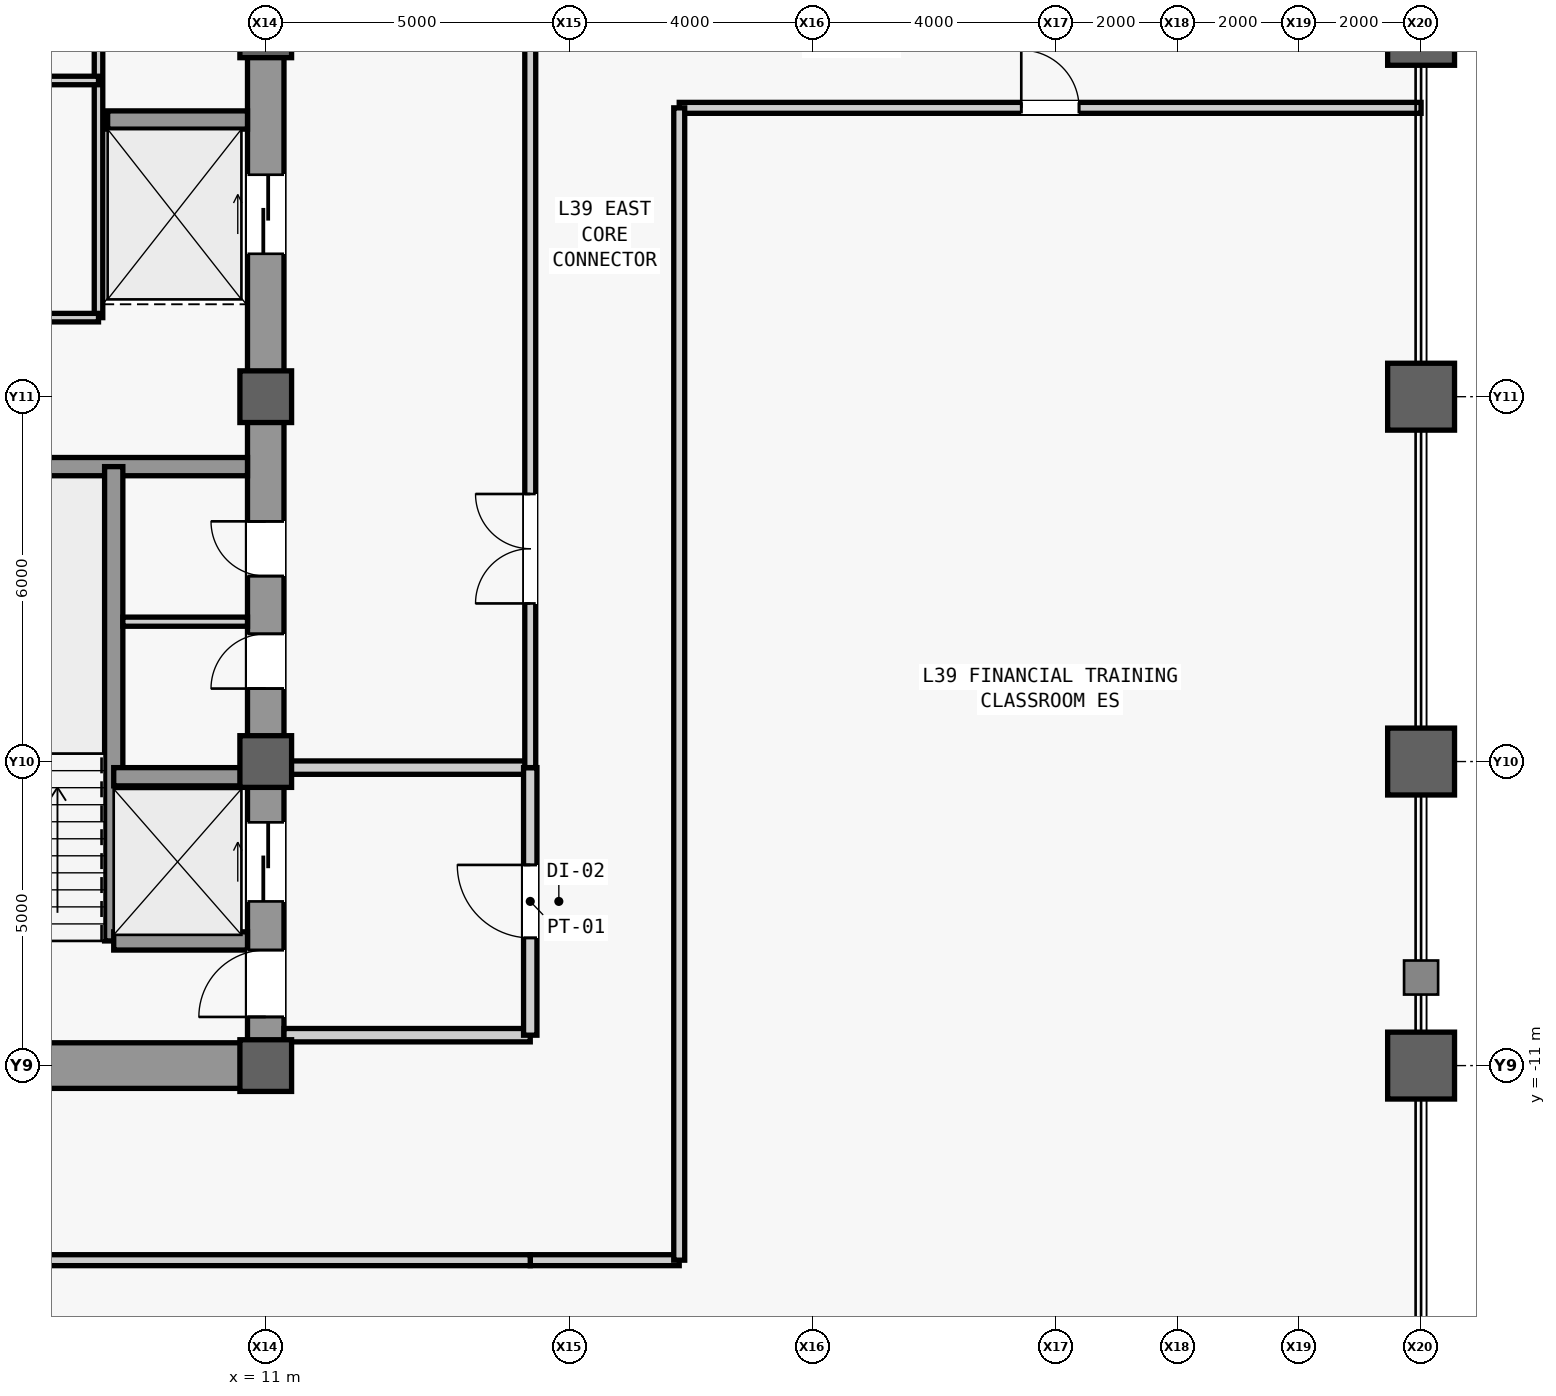
"""IFC4 building model, lengths in metres.
Left out: names, types, materials, properties, quantities, classifications, styles, units other than length and angle.
Written with IfcOpenShell. Run it as: python <this file> out.ifc"""

import sys

from ifc_helpers import new_model, si_unit, direction, frame, frame_2d, origin, origin_2d, place, context, subcontext, project, spatial, rectangle, hollow_rectangle, extrude, source, transform, mapped, element, fill, save


model = new_model("IFC4")
c1 = context("Model", 3, precision=1e-05, world=origin(), true_north=direction((0.0, 1.0)))
c2 = subcontext(c1, "Body", "Model", "MODEL_VIEW")
j1 = project(units=[si_unit("LENGTHUNIT", "METRE"), si_unit("PLANEANGLEUNIT", "RADIAN")], contexts=[c1])
p1 = place(None, origin())
s1 = spatial("IfcSite", under=j1, at=p1, CompositionType="ELEMENT")
p2 = place(p1, origin())
s2 = spatial("IfcBuilding", under=s1, at=p2, CompositionType="ELEMENT")
p3 = place(p2, frame((0.0, 0.0, 171.1)))
s3 = spatial("IfcBuildingStorey", under=s2, at=p3, CompositionType="ELEMENT", Elevation=171.1)
m1 = source(origin(), c2, "Body", "SweptSolid", [
    extrude(rectangle(XDim=22.0, YDim=0.6, at=frame_2d((11.0, 0.0))), origin(), (0.0, 0.0, 1.0), 3.78),
])
p4 = place(p3, frame((11.0, -11.0, 0.0), z_axis=(0.0, 0.0, 1.0), x_axis=(0.0, 1.0, 0.0)))
e1 = element("IfcWall", 1, at=p4, inside=s3, PredefinedType="SHEAR", context=c2, shape_type="MappedRepresentation", body=[
    mapped(m1, transform((0.0, 0.0, 0.0), scale=1.0)),
])
m2 = source(origin(), c2, "Body", "SweptSolid", [
    extrude(rectangle(XDim=1.1, YDim=2.2, at=frame_2d((0.55, 1.1))), frame((0.0, 0.31, 0.0), z_axis=(0.0, -1.0, 0.0), x_axis=(1.0, 0.0, 0.0)), (0.0, 0.0, 1.0), 0.62),
])
p5 = place(p4, frame((0.8, 0.0, 0.0)))
e2 = element("IfcOpeningElement", 2, at=p5, cuts=e1, PredefinedType="OPENING", context=c2, shape_type="MappedRepresentation", body=[
    mapped(m2, transform((0.0, 0.0, 0.0), scale=1.0)),
])
m3 = source(origin(), c2, "Body", "SweptSolid", [
    extrude(rectangle(XDim=0.9, YDim=2.15, at=frame_2d((0.45, 1.075))), frame((0.0, 0.31, 0.0), z_axis=(0.0, -1.0, 0.0), x_axis=(1.0, 0.0, 0.0)), (0.0, 0.0, 1.0), 0.62),
])
p6 = place(p4, frame((6.2, 0.0, 0.0)))
e3 = element("IfcOpeningElement", 3, at=p6, cuts=e1, PredefinedType="OPENING", context=c2, shape_type="MappedRepresentation", body=[
    mapped(m3, transform((0.0, 0.0, 0.0), scale=1.0)),
])
p7 = place(p4, frame((8.05, 0.0, 0.0)))
e4 = element("IfcOpeningElement", 4, at=p7, cuts=e1, PredefinedType="OPENING", context=c2, shape_type="MappedRepresentation", body=[
    mapped(m3, transform((0.0, 0.0, 0.0), scale=1.0)),
])
m4 = source(origin(), c2, "Body", "SweptSolid", [
    extrude(rectangle(XDim=1.3, YDim=2.3, at=frame_2d((0.65, 1.15))), frame((0.0, 0.31, 0.0), z_axis=(0.0, -1.0, 0.0), x_axis=(1.0, 0.0, 0.0)), (0.0, 0.0, 1.0), 0.62),
])
p8 = place(p4, frame((2.7, 0.0, 0.0)))
e5 = element("IfcOpeningElement", 5, at=p8, cuts=e1, PredefinedType="OPENING", context=c2, shape_type="MappedRepresentation", body=[
    mapped(m4, transform((0.0, 0.0, 0.0), scale=1.0)),
])
p9 = place(p4, frame((13.35, 0.0, 0.0)))
e6 = element("IfcOpeningElement", 6, at=p9, cuts=e1, PredefinedType="OPENING", context=c2, shape_type="MappedRepresentation", body=[
    mapped(m4, transform((0.0, 0.0, 0.0), scale=1.0)),
])
m5 = source(origin(), c2, "Body", "SweptSolid", [
    extrude(rectangle(XDim=5.85, YDim=0.75, at=frame_2d((2.925, 0.0))), origin(), (0.0, 0.0, 1.0), 3.78),
])
p10 = place(p3, frame((4.85, -11.0, 0.0), z_axis=(0.0, 0.0, 1.0), x_axis=(1.0, 0.0, 0.0)))
e7 = element("IfcWall", 7, at=p10, inside=s3, PredefinedType="SHEAR", context=c2, shape_type="MappedRepresentation", body=[
    mapped(m5, transform((0.0, 0.0, 0.0), scale=1.0)),
])
m6 = source(origin(), c2, "Body", "SweptSolid", [
    extrude(rectangle(XDim=5.6, YDim=0.3, at=frame_2d((2.8, 0.0))), origin(), (0.0, 0.0, 1.0), 3.78),
])
p11 = place(p3, frame((5.1, -1.15, 0.0), z_axis=(0.0, 0.0, 1.0), x_axis=(1.0, 0.0, 0.0)))
e8 = element("IfcWall", 8, at=p11, inside=s3, PredefinedType="SHEAR", context=c2, shape_type="MappedRepresentation", body=[
    mapped(m6, transform((0.0, 0.0, 0.0), scale=1.0)),
])
m7 = source(origin(), c2, "Body", "SweptSolid", [
    extrude(rectangle(XDim=0.85, YDim=0.85, at=origin_2d()), origin(), (0.0, 0.0, 1.0), 4.0),
])
for number, where, z_axis, x_axis in (
    (9, (11.0, -11.0, 0.0), (0.0, 0.0, 1.0), (1.0, 0.0, 0.0)),
    (10, (11.0, -6.0, 0.0), (0.0, 0.0, 1.0), (1.0, 0.0, 0.0)),
    (11, (11.0, 0.0, 0.0), (0.0, 0.0, 1.0), (1.0, 0.0, 0.0)),
    (12, (11.0, 6.0, 0.0), (0.0, 0.0, 1.0), (1.0, 0.0, 0.0)),
):
    element("IfcColumn", number, at=place(p3, frame(where, z_axis=z_axis, x_axis=x_axis)), inside=s3, PredefinedType="COLUMN", context=c2, shape_type="MappedRepresentation", body=[
        mapped(m7, transform((0.0, 0.0, 0.0), scale=1.0)),
    ])
m8 = source(origin(), c2, "Body", "SweptSolid", [
    extrude(hollow_rectangle(XDim=1.1, YDim=1.1, WallThickness=0.06, at=origin_2d()), origin(), (0.0, 0.0, 1.0), 4.0),
])
for number, where, z_axis, x_axis in (
    (13, (30.0, -11.0, 0.0), (0.0, 0.0, 1.0), (1.0, 0.0, 0.0)),
    (14, (30.0, -6.0, 0.0), (0.0, 0.0, 1.0), (1.0, 0.0, 0.0)),
    (15, (30.0, 0.0, 0.0), (0.0, 0.0, 1.0), (1.0, 0.0, 0.0)),
    (16, (30.0, 6.0, 0.0), (0.0, 0.0, 1.0), (1.0, 0.0, 0.0)),
):
    element("IfcColumn", number, at=place(p3, frame(where, z_axis=z_axis, x_axis=x_axis)), inside=s3, PredefinedType="COLUMN", context=c2, shape_type="MappedRepresentation", body=[
        mapped(m8, transform((0.0, 0.0, 0.0), scale=1.0)),
    ])
m9 = source(origin(), c2, "Body", "SweptSolid", [
    extrude(rectangle(XDim=7.8, YDim=0.3, at=frame_2d((3.9, 0.0))), origin(), (0.0, 0.0, 1.0), 3.78),
])
p12 = place(p3, frame((8.5, -8.95, 0.0), z_axis=(0.0, 0.0, 1.0), x_axis=(0.0, 1.0, 0.0)))
e17 = element("IfcWall", 17, at=p12, inside=s3, PredefinedType="SHEAR", context=c2, shape_type="MappedRepresentation", body=[
    mapped(m9, transform((0.0, 0.0, 0.0), scale=1.0)),
])
m10 = source(origin(), c2, "Body", "SweptSolid", [
    extrude(rectangle(XDim=2.2, YDim=0.3, at=frame_2d((1.1, 0.0))), origin(), (0.0, 0.0, 1.0), 3.78),
])
for number, where, z_axis, x_axis in (
    (18, (8.5, -8.95, 0.0), (0.0, 0.0, 1.0), (1.0, 0.0, 0.0)),
    (19, (8.5, -6.25, 0.0), (0.0, 0.0, 1.0), (1.0, 0.0, 0.0)),
):
    element("IfcWall", number, at=place(p3, frame(where, z_axis=z_axis, x_axis=x_axis)), inside=s3, PredefinedType="SHEAR", context=c2, shape_type="MappedRepresentation", body=[
        mapped(m10, transform((0.0, 0.0, 0.0), scale=1.0)),
    ])
m11 = source(origin(), c2, "Body", "SweptSolid", [
    extrude(rectangle(XDim=2.3, YDim=0.3, at=frame_2d((1.15, 0.0))), origin(), (0.0, 0.0, 1.0), 3.78),
])
p13 = place(p3, frame((8.4, 4.55, 0.0), z_axis=(0.0, 0.0, 1.0), x_axis=(1.0, 0.0, 0.0)))
e20 = element("IfcWall", 20, at=p13, inside=s3, PredefinedType="SHEAR", context=c2, shape_type="MappedRepresentation", body=[
    mapped(m11, transform((0.0, 0.0, 0.0), scale=1.0)),
])
m12 = source(origin(), c2, "Body", "SweptSolid", [
    extrude(rectangle(XDim=2.05, YDim=0.15, at=frame_2d((1.025, 0.0))), origin(), (0.0, 0.0, 1.0), 3.78),
])
p14 = place(p3, frame((8.65, -3.7, 0.0), z_axis=(0.0, 0.0, 1.0), x_axis=(1.0, 0.0, 0.0)))
e21 = element("IfcWall", 21, at=p14, inside=s3, PredefinedType="PARTITIONING", context=c2, shape_type="MappedRepresentation", body=[
    mapped(m12, transform((0.0, 0.0, 0.0), scale=1.0)),
])
m13 = source(origin(), c2, "Body", "SweptSolid", [
    extrude(rectangle(XDim=9.4, YDim=0.14, at=frame_2d((4.7, 0.0))), origin(), (0.0, 0.0, 1.0), 3.78),
])
p15 = place(p3, frame((8.25, 1.3, 0.0), z_axis=(0.0, 0.0, 1.0), x_axis=(0.0, 1.0, 0.0)))
e22 = element("IfcWall", 22, at=p15, inside=s3, PredefinedType="PARTITIONING", context=c2, shape_type="MappedRepresentation", body=[
    mapped(m13, transform((0.0, 0.0, 0.0), scale=1.0)),
])
m14 = source(origin(), c2, "Body", "SweptSolid", [
    extrude(rectangle(XDim=3.15, YDim=0.14, at=frame_2d((1.575, 0.0))), origin(), (0.0, 0.0, 1.0), 3.78),
])
p16 = place(p3, frame((5.1, 1.3, 0.0), z_axis=(0.0, 0.0, 1.0), x_axis=(1.0, 0.0, 0.0)))
e23 = element("IfcWall", 23, at=p16, inside=s3, PredefinedType="PARTITIONING", context=c2, shape_type="MappedRepresentation", body=[
    mapped(m14, transform((0.0, 0.0, 0.0), scale=1.0)),
])
p17 = place(p3, frame((5.1, 5.2, 0.0), z_axis=(0.0, 0.0, 1.0), x_axis=(1.0, 0.0, 0.0)))
e24 = element("IfcWall", 24, at=p17, inside=s3, PredefinedType="PARTITIONING", context=c2, shape_type="MappedRepresentation", body=[
    mapped(m14, transform((0.0, 0.0, 0.0), scale=1.0)),
])
m15 = source(origin(), c2, "Body", "SweptSolid", [
    extrude(rectangle(XDim=0.9, YDim=2.15, at=frame_2d((0.45, 1.075))), frame((0.0, 0.08, 0.0), z_axis=(0.0, -1.0, 0.0), x_axis=(1.0, 0.0, 0.0)), (0.0, 0.0, 1.0), 0.16),
])
p18 = place(p17, frame((1.13, 0.0, 0.0)))
e25 = element("IfcOpeningElement", 25, at=p18, cuts=e24, PredefinedType="OPENING", context=c2, shape_type="MappedRepresentation", body=[
    mapped(m15, transform((0.0, 0.0, 0.0), scale=1.0)),
])
m16 = source(origin(), c2, "Body", "SweptSolid", [
    extrude(rectangle(XDim=4.05, YDim=0.22, at=frame_2d((2.025, 0.0))), origin(), (0.0, 0.0, 1.0), 3.78),
])
p19 = place(p3, frame((11.3, -10.5, 0.0), z_axis=(0.0, 0.0, 1.0), x_axis=(1.0, 0.0, 0.0)))
e26 = element("IfcWall", 26, at=p19, inside=s3, PredefinedType="PARTITIONING", context=c2, shape_type="MappedRepresentation", body=[
    mapped(m16, transform((0.0, 0.0, 0.0), scale=1.0)),
])
m17 = source(origin(), c2, "Body", "SweptSolid", [
    extrude(rectangle(XDim=4.05, YDim=0.22, at=frame_2d((2.025, 0.0))), origin(), (0.0, 0.0, 1.0), 3.007),
])
p20 = place(p3, frame((11.3, -6.1, 0.0), z_axis=(0.0, 0.0, 1.0), x_axis=(1.0, 0.0, 0.0)))
e27 = element("IfcWall", 27, at=p20, inside=s3, PredefinedType="PARTITIONING", context=c2, shape_type="MappedRepresentation", body=[
    mapped(m17, transform((0.0, 0.0, 0.0), scale=1.0)),
])
m18 = source(origin(), c2, "Body", "SweptSolid", [
    extrude(rectangle(XDim=4.4, YDim=0.22, at=frame_2d((2.2, 0.0))), origin(), (0.0, 0.0, 1.0), 3.78),
])
p21 = place(p3, frame((15.35, -10.5, 0.0), z_axis=(0.0, 0.0, 1.0), x_axis=(0.0, 1.0, 0.0)))
e28 = element("IfcWall", 28, at=p21, inside=s3, PredefinedType="PARTITIONING", context=c2, shape_type="MappedRepresentation", body=[
    mapped(m18, transform((0.0, 0.0, 0.0), scale=1.0)),
])
m19 = source(origin(), c2, "Body", "SweptSolid", [
    extrude(rectangle(XDim=1.2, YDim=2.2, at=frame_2d((0.6, 1.1))), frame((0.0, 0.12, 0.0), z_axis=(0.0, -1.0, 0.0), x_axis=(1.0, 0.0, 0.0)), (0.0, 0.0, 1.0), 0.24),
])
p22 = place(p21, frame((1.6, 0.0, 0.0)))
e29 = element("IfcOpeningElement", 29, at=p22, cuts=e28, PredefinedType="OPENING", context=c2, shape_type="MappedRepresentation", body=[
    mapped(m19, transform((0.0, 0.0, 0.0), scale=1.0)),
])
m20 = source(origin(), c2, "Body", "SweptSolid", [
    extrude(rectangle(XDim=16.6, YDim=0.18, at=frame_2d((8.3, 0.0))), origin(), (0.0, 0.0, 1.0), 3.78),
])
p23 = place(p3, frame((15.35, -6.1, 0.0), z_axis=(0.0, 0.0, 1.0), x_axis=(0.0, 1.0, 0.0)))
e30 = element("IfcWall", 30, at=p23, inside=s3, PredefinedType="PARTITIONING", context=c2, shape_type="MappedRepresentation", body=[
    mapped(m20, transform((0.0, 0.0, 0.0), scale=1.0)),
])
m21 = source(origin(), c2, "Body", "SweptSolid", [
    extrude(rectangle(XDim=1.8, YDim=2.25, at=frame_2d((0.9, 1.125))), frame((0.0, 0.1, 0.0), z_axis=(0.0, -1.0, 0.0), x_axis=(1.0, 0.0, 0.0)), (0.0, 0.0, 1.0), 0.2),
])
p24 = place(p23, frame((2.7, 0.0, 0.0)))
e31 = element("IfcOpeningElement", 31, at=p24, cuts=e30, PredefinedType="OPENING", context=c2, shape_type="MappedRepresentation", body=[
    mapped(m21, transform((0.0, 0.0, 0.0), scale=1.0)),
])
p25 = place(p23, frame((13.0, 0.0, 0.0)))
e32 = element("IfcOpeningElement", 32, at=p25, cuts=e30, PredefinedType="OPENING", context=c2, shape_type="MappedRepresentation", body=[
    mapped(m21, transform((0.0, 0.0, 0.0), scale=1.0)),
])
m22 = source(origin(), c2, "Body", "SweptSolid", [
    extrude(rectangle(XDim=2.45, YDim=0.18, at=frame_2d((1.225, 0.0))), origin(), (0.0, 0.0, 1.0), 3.78),
])
p26 = place(p3, frame((15.35, -14.2, 0.0), z_axis=(0.0, 0.0, 1.0), x_axis=(1.0, 0.0, 0.0)))
e33 = element("IfcWall", 33, at=p26, inside=s3, PredefinedType="PARTITIONING", context=c2, shape_type="MappedRepresentation", body=[
    mapped(m22, transform((0.0, 0.0, 0.0), scale=1.0)),
])
m23 = source(origin(), c2, "Body", "SweptSolid", [
    extrude(rectangle(XDim=16.85, YDim=0.18, at=frame_2d((8.425, 0.0))), origin(), (0.0, 0.0, 1.0), 3.78),
])
p27 = place(p3, frame((-1.5, -14.2, 0.0), z_axis=(0.0, 0.0, 1.0), x_axis=(1.0, 0.0, 0.0)))
e34 = element("IfcWall", 34, at=p27, inside=s3, PredefinedType="PARTITIONING", context=c2, shape_type="MappedRepresentation", body=[
    mapped(m23, transform((0.0, 0.0, 0.0), scale=1.0)),
])
m24 = source(origin(), c2, "Body", "SweptSolid", [
    extrude(rectangle(XDim=12.2, YDim=0.18, at=frame_2d((6.1, 0.0))), origin(), (0.0, 0.0, 1.0), 3.78),
])
p28 = place(p3, frame((17.8, 4.75, 0.0), z_axis=(0.0, 0.0, 1.0), x_axis=(1.0, 0.0, 0.0)))
e35 = element("IfcWall", 35, at=p28, inside=s3, PredefinedType="PARTITIONING", context=c2, shape_type="MappedRepresentation", body=[
    mapped(m24, transform((0.0, 0.0, 0.0), scale=1.0)),
])
m25 = source(origin(), c2, "Body", "SweptSolid", [
    extrude(rectangle(XDim=0.95, YDim=2.15, at=frame_2d((0.475, 1.075))), frame((0.0, 0.1, 0.0), z_axis=(0.0, -1.0, 0.0), x_axis=(1.0, 0.0, 0.0)), (0.0, 0.0, 1.0), 0.2),
])
p29 = place(p28, frame((5.625, 0.0, 0.0)))
e36 = element("IfcOpeningElement", 36, at=p29, cuts=e35, PredefinedType="OPENING", context=c2, shape_type="MappedRepresentation", body=[
    mapped(m25, transform((0.0, 0.0, 0.0), scale=1.0)),
])
m26 = source(origin(), c2, "Body", "SweptSolid", [
    extrude(rectangle(XDim=18.95, YDim=0.18, at=frame_2d((9.475, 0.0))), origin(), (0.0, 0.0, 1.0), 3.78),
])
p30 = place(p3, frame((17.8, -14.2, 0.0), z_axis=(0.0, 0.0, 1.0), x_axis=(0.0, 1.0, 0.0)))
e37 = element("IfcWall", 37, at=p30, inside=s3, PredefinedType="PARTITIONING", context=c2, shape_type="MappedRepresentation", body=[
    mapped(m26, transform((0.0, 0.0, 0.0), scale=1.0)),
])
m27 = source(origin(), c2, "Body", "SweptSolid", [
    extrude(rectangle(XDim=1.1, YDim=2.2, at=frame_2d((0.55, 1.1))), frame((0.0, 0.025, 0.0), z_axis=(0.0, -1.0, 0.0), x_axis=(1.0, 0.0, 0.0)), (0.0, 0.0, 1.0), 0.05),
])
p31 = place(p5, origin())
e38 = element("IfcDoor", 38, at=p31, inside=s3, OperationType="SINGLE_SWING_LEFT", PredefinedType="DOOR", context=c2, shape_type="MappedRepresentation", body=[
    mapped(m27, transform((0.0, 0.0, 0.0), scale=1.0)),
])
fill(e2, e38)
m28 = source(origin(), c2, "Body", "SweptSolid", [
    extrude(rectangle(XDim=0.9, YDim=2.15, at=frame_2d((0.45, 1.075))), frame((0.0, 0.025, 0.0), z_axis=(0.0, -1.0, 0.0), x_axis=(1.0, 0.0, 0.0)), (0.0, 0.0, 1.0), 0.05),
])
p32 = place(p6, origin())
e39 = element("IfcDoor", 39, at=p32, inside=s3, OperationType="SINGLE_SWING_LEFT", PredefinedType="DOOR", context=c2, shape_type="MappedRepresentation", body=[
    mapped(m28, transform((0.0, 0.0, 0.0), scale=1.0)),
])
fill(e3, e39)
p33 = place(p7, origin())
e40 = element("IfcDoor", 40, at=p33, inside=s3, OperationType="SINGLE_SWING_RIGHT", PredefinedType="DOOR", context=c2, shape_type="MappedRepresentation", body=[
    mapped(m28, transform((0.0, 0.0, 0.0), scale=1.0)),
])
fill(e4, e40)
m29 = source(origin(), c2, "Body", "SweptSolid", [
    extrude(rectangle(XDim=1.2, YDim=2.2, at=frame_2d((0.6, 1.1))), frame((0.0, 0.025, 0.0), z_axis=(0.0, -1.0, 0.0), x_axis=(1.0, 0.0, 0.0)), (0.0, 0.0, 1.0), 0.05),
])
p34 = place(p22, origin())
e41 = element("IfcDoor", 41, at=p34, inside=s3, OperationType="SINGLE_SWING_RIGHT", PredefinedType="DOOR", context=c2, shape_type="MappedRepresentation", body=[
    mapped(m29, transform((0.0, 0.0, 0.0), scale=1.0)),
])
fill(e29, e41)
m30 = source(origin(), c2, "Body", "SweptSolid", [
    extrude(rectangle(XDim=1.8, YDim=2.25, at=frame_2d((0.9, 1.125))), frame((0.0, 0.025, 0.0), z_axis=(0.0, -1.0, 0.0), x_axis=(1.0, 0.0, 0.0)), (0.0, 0.0, 1.0), 0.05),
])
p35 = place(p24, origin())
e42 = element("IfcDoor", 42, at=p35, inside=s3, OperationType="SINGLE_SWING_RIGHT", PredefinedType="DOOR", context=c2, shape_type="MappedRepresentation", body=[
    mapped(m30, transform((0.0, 0.0, 0.0), scale=1.0)),
])
fill(e31, e42)
m31 = source(origin(), c2, "Body", "SweptSolid", [
    extrude(rectangle(XDim=0.95, YDim=2.15, at=frame_2d((0.475, 1.075))), frame((0.0, 0.025, 0.0), z_axis=(0.0, -1.0, 0.0), x_axis=(1.0, 0.0, 0.0)), (0.0, 0.0, 1.0), 0.05),
])
p36 = place(p29, origin())
e43 = element("IfcDoor", 43, at=p36, inside=s3, OperationType="SINGLE_SWING_LEFT", PredefinedType="DOOR", context=c2, shape_type="MappedRepresentation", body=[
    mapped(m31, transform((0.0, 0.0, 0.0), scale=1.0)),
])
fill(e36, e43)
m32 = source(origin(), c2, "Body", "SweptSolid", [
    extrude(rectangle(XDim=1.3, YDim=2.3, at=frame_2d((0.65, 1.15))), frame((0.0, 0.025, 0.0), z_axis=(0.0, -1.0, 0.0), x_axis=(1.0, 0.0, 0.0)), (0.0, 0.0, 1.0), 0.05),
])
p37 = place(p8, origin())
e44 = element("IfcDoor", 44, at=p37, inside=s3, OperationType="SLIDING_TO_LEFT", PredefinedType="DOOR", context=c2, shape_type="MappedRepresentation", body=[
    mapped(m32, transform((0.0, 0.0, 0.0), scale=1.0)),
])
fill(e5, e44)
p38 = place(p9, origin())
e45 = element("IfcDoor", 45, at=p38, inside=s3, OperationType="SLIDING_TO_LEFT", PredefinedType="DOOR", context=c2, shape_type="MappedRepresentation", body=[
    mapped(m32, transform((0.0, 0.0, 0.0), scale=1.0)),
])
fill(e6, e45)
save(model, sys.argv[1])
